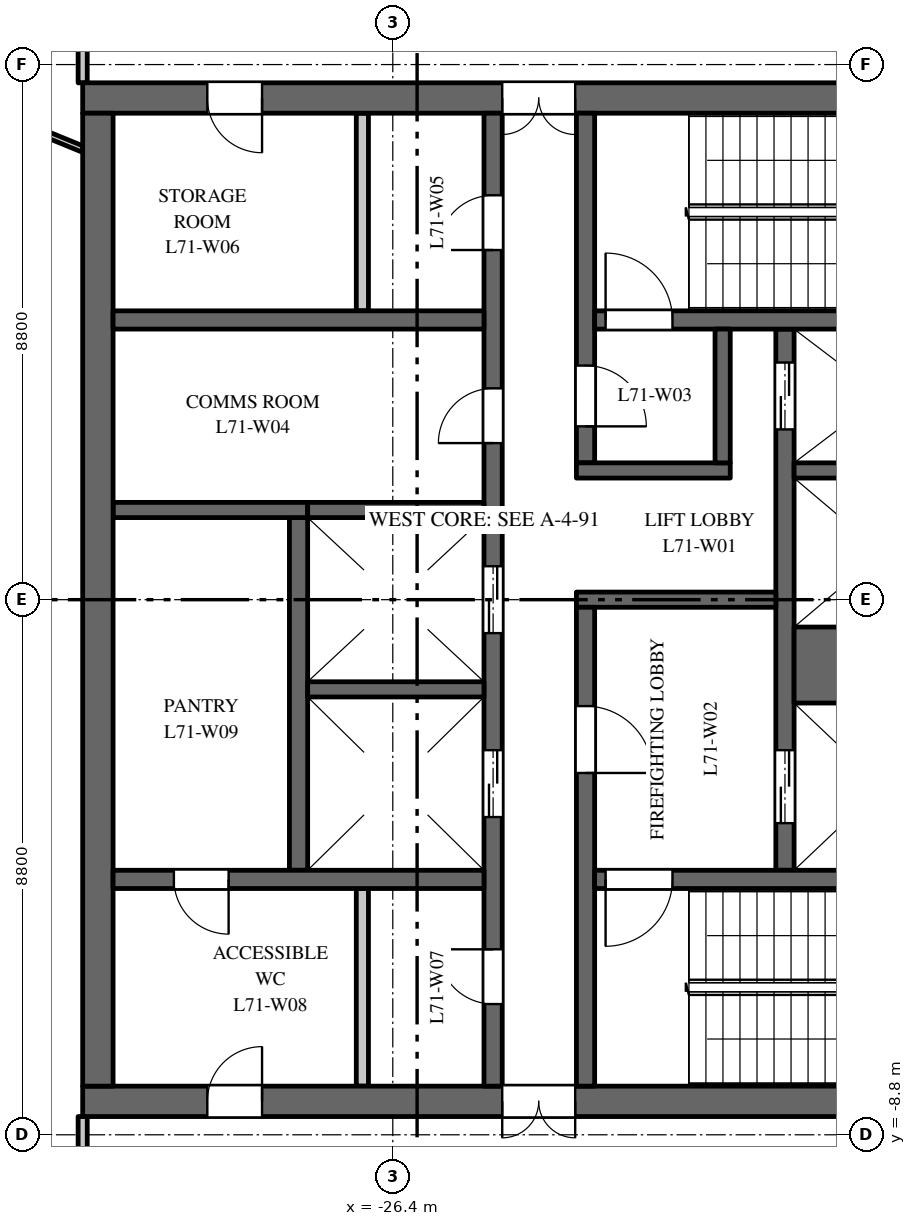
"""IFC4 building model, lengths in metres.
Left out: names, types, materials, properties, quantities, classifications, styles, units other than length and angle.
Written with IfcOpenShell. Run it as: python <this file> out.ifc"""

import sys

from ifc_helpers import new_model, si_unit, direction, frame, frame_2d, origin, place, context, subcontext, project, spatial, rectangle, extrude, element, fill, save


model = new_model("IFC4")
c1 = context("Model", 3, precision=1e-05, world=origin(), true_north=direction((0.0, 1.0)))
c2 = subcontext(c1, "Body", "Model", "MODEL_VIEW")
j1 = project(units=[si_unit("LENGTHUNIT", "METRE"), si_unit("PLANEANGLEUNIT", "RADIAN")], contexts=[c1])
p1 = place(None, origin())
s1 = spatial("IfcSite", under=j1, at=p1, CompositionType="ELEMENT")
p2 = place(p1, origin())
s2 = spatial("IfcBuilding", under=s1, at=p2, CompositionType="ELEMENT")
p3 = place(p2, frame((0.0, 0.0, 327.0)))
s3 = spatial("IfcBuildingStorey", under=s2, at=p3, CompositionType="ELEMENT", Elevation=327.0)
p4 = place(p3, frame((-16.5, 8.25, 0.0), z_axis=(0.0, 0.0, 1.0), x_axis=(-1.0, 0.0, 0.0)))
e1 = element("IfcWall", 1, at=p4, inside=s3, PredefinedType="SHEAR", context=c2, shape_type="SweptSolid", body=[
    extrude(rectangle(XDim=15.0, YDim=0.5, at=frame_2d((7.5, 0.0))), origin(), (0.0, 0.0, 1.0), 3.7),
])
p5 = place(p4, frame((6.9, 0.0, 0.0)))
e2 = element("IfcOpeningElement", 2, at=p5, cuts=e1, PredefinedType="OPENING", context=c2, shape_type="SweptSolid", body=[
    extrude(rectangle(XDim=1.2, YDim=2.1, at=frame_2d((0.6, 1.05))), frame((0.0, 0.26, 0.0), z_axis=(0.0, -1.0, 0.0), x_axis=(1.0, 0.0, 0.0)), (0.0, 0.0, 1.0), 0.52),
])
p6 = place(p4, frame((12.05, 0.0, 0.0)))
e3 = element("IfcOpeningElement", 3, at=p6, cuts=e1, PredefinedType="OPENING", context=c2, shape_type="SweptSolid", body=[
    extrude(rectangle(XDim=0.9, YDim=2.1, at=frame_2d((0.45, 1.05))), frame((0.0, 0.26, 0.0), z_axis=(0.0, -1.0, 0.0), x_axis=(1.0, 0.0, 0.0)), (0.0, 0.0, 1.0), 0.52),
])
p7 = place(p3, frame((-16.5, -8.25, 0.0), z_axis=(0.0, 0.0, 1.0), x_axis=(-1.0, 0.0, 0.0)))
e4 = element("IfcWall", 4, at=p7, inside=s3, PredefinedType="SHEAR", context=c2, shape_type="SweptSolid", body=[
    extrude(rectangle(XDim=15.0, YDim=0.5, at=frame_2d((7.5, 0.0))), origin(), (0.0, 0.0, 1.0), 3.7),
])
p8 = place(p7, frame((6.9, 0.0, 0.0)))
e5 = element("IfcOpeningElement", 5, at=p8, cuts=e4, PredefinedType="OPENING", context=c2, shape_type="SweptSolid", body=[
    extrude(rectangle(XDim=1.2, YDim=2.1, at=frame_2d((0.6, 1.05))), frame((0.0, 0.26, 0.0), z_axis=(0.0, -1.0, 0.0), x_axis=(1.0, 0.0, 0.0)), (0.0, 0.0, 1.0), 0.52),
])
p9 = place(p7, frame((12.05, 0.0, 0.0)))
e6 = element("IfcOpeningElement", 6, at=p9, cuts=e4, PredefinedType="OPENING", context=c2, shape_type="SweptSolid", body=[
    extrude(rectangle(XDim=0.9, YDim=2.1, at=frame_2d((0.45, 1.05))), frame((0.0, 0.26, 0.0), z_axis=(0.0, -1.0, 0.0), x_axis=(1.0, 0.0, 0.0)), (0.0, 0.0, 1.0), 0.52),
])
p10 = place(p3, frame((-27.95, -4.45, 0.0), z_axis=(0.0, 0.0, 1.0), x_axis=(0.0, 1.0, 0.0)))
e7 = element("IfcWall", 7, at=p10, inside=s3, PredefinedType="SHEAR", context=c2, shape_type="SweptSolid", body=[
    extrude(rectangle(XDim=5.8, YDim=0.3, at=frame_2d((2.9, 0.0))), origin(), (0.0, 0.0, 1.0), 3.7),
])
p11 = place(p3, frame((-27.8, 1.475, 0.0), z_axis=(0.0, 0.0, 1.0), x_axis=(-1.0, 0.0, 0.0)))
e8 = element("IfcWall", 8, at=p11, inside=s3, PredefinedType="SHEAR", context=c2, shape_type="SweptSolid", body=[
    extrude(rectangle(XDim=3.2, YDim=0.25, at=frame_2d((1.6, 0.0))), origin(), (0.0, 0.0, 1.0), 3.7),
])
p12 = place(p3, frame((-19.95, -4.45, 0.0), z_axis=(0.0, 0.0, 1.0), x_axis=(0.0, 1.0, 0.0)))
e9 = element("IfcWall", 9, at=p12, inside=s3, PredefinedType="SHEAR", context=c2, shape_type="SweptSolid", body=[
    extrude(rectangle(XDim=8.9, YDim=0.3, at=frame_2d((4.45, 0.0))), origin(), (0.0, 0.0, 1.0), 3.7),
])
p13 = place(p12, frame((0.775, 0.0, 0.0)))
e10 = element("IfcOpeningElement", 10, at=p13, cuts=e9, PredefinedType="OPENING", context=c2, shape_type="SweptSolid", body=[
    extrude(rectangle(XDim=1.2, YDim=2.1, at=frame_2d((0.6, 1.05))), frame((0.0, 0.16, 0.0), z_axis=(0.0, -1.0, 0.0), x_axis=(1.0, 0.0, 0.0)), (0.0, 0.0, 1.0), 0.32),
])
p14 = place(p12, frame((7.25, 0.0, 0.0)))
e11 = element("IfcOpeningElement", 11, at=p14, cuts=e9, PredefinedType="OPENING", context=c2, shape_type="SweptSolid", body=[
    extrude(rectangle(XDim=1.1, YDim=2.1, at=frame_2d((0.55, 1.05))), frame((0.0, 0.16, 0.0), z_axis=(0.0, -1.0, 0.0), x_axis=(1.0, 0.0, 0.0)), (0.0, 0.0, 1.0), 0.32),
])
p15 = place(p3, frame((-24.75, -8.0, 0.0), z_axis=(0.0, 0.0, 1.0), x_axis=(0.0, 1.0, 0.0)))
e12 = element("IfcWall", 12, at=p15, inside=s3, PredefinedType="SHEAR", context=c2, shape_type="SweptSolid", body=[
    extrude(rectangle(XDim=16.0, YDim=0.3, at=frame_2d((8.0, 0.0))), origin(), (0.0, 0.0, 1.0), 3.7),
])
p16 = place(p15, frame((4.425, 0.0, 0.0)))
e13 = element("IfcOpeningElement", 13, at=p16, cuts=e12, PredefinedType="OPENING", context=c2, shape_type="SweptSolid", body=[
    extrude(rectangle(XDim=1.1, YDim=2.1, at=frame_2d((0.55, 1.05))), frame((0.0, 0.16, 0.0), z_axis=(0.0, -1.0, 0.0), x_axis=(1.0, 0.0, 0.0)), (0.0, 0.0, 1.0), 0.32),
])
p17 = place(p15, frame((7.45, 0.0, 0.0)))
e14 = element("IfcOpeningElement", 14, at=p17, cuts=e12, PredefinedType="OPENING", context=c2, shape_type="SweptSolid", body=[
    extrude(rectangle(XDim=1.1, YDim=2.1, at=frame_2d((0.55, 1.05))), frame((0.0, 0.16, 0.0), z_axis=(0.0, -1.0, 0.0), x_axis=(1.0, 0.0, 0.0)), (0.0, 0.0, 1.0), 0.32),
])
p18 = place(p15, frame((10.575, 0.0, 0.0)))
e15 = element("IfcOpeningElement", 15, at=p18, cuts=e12, PredefinedType="OPENING", context=c2, shape_type="SweptSolid", body=[
    extrude(rectangle(XDim=0.9, YDim=2.1, at=frame_2d((0.45, 1.05))), frame((0.0, 0.16, 0.0), z_axis=(0.0, -1.0, 0.0), x_axis=(1.0, 0.0, 0.0)), (0.0, 0.0, 1.0), 0.32),
])
p19 = place(p15, frame((13.75, 0.0, 0.0)))
e16 = element("IfcOpeningElement", 16, at=p19, cuts=e12, PredefinedType="OPENING", context=c2, shape_type="SweptSolid", body=[
    extrude(rectangle(XDim=0.9, YDim=2.1, at=frame_2d((0.45, 1.05))), frame((0.0, 0.16, 0.0), z_axis=(0.0, -1.0, 0.0), x_axis=(1.0, 0.0, 0.0)), (0.0, 0.0, 1.0), 0.32),
])
p20 = place(p15, frame((1.35, 0.0, 0.0)))
e17 = element("IfcOpeningElement", 17, at=p20, cuts=e12, PredefinedType="OPENING", context=c2, shape_type="SweptSolid", body=[
    extrude(rectangle(XDim=0.9, YDim=2.1, at=frame_2d((0.45, 1.05))), frame((0.0, 0.16, 0.0), z_axis=(0.0, -1.0, 0.0), x_axis=(1.0, 0.0, 0.0)), (0.0, 0.0, 1.0), 0.32),
])
p21 = place(p3, frame((-20.1, 0.0, 0.0), z_axis=(0.0, 0.0, 1.0), x_axis=(-1.0, 0.0, 0.0)))
e18 = element("IfcWall", 18, at=p21, inside=s3, PredefinedType="SHEAR", context=c2, shape_type="SweptSolid", body=[
    extrude(rectangle(XDim=3.28, YDim=0.25, at=frame_2d((1.64, 0.0))), origin(), (0.0, 0.0, 1.0), 3.7),
])
p22 = place(p3, frame((-31.25, -8.0, 0.0), z_axis=(0.0, 0.0, 1.0), x_axis=(0.0, 1.0, 0.0)))
e19 = element("IfcWall", 19, at=p22, inside=s3, PredefinedType="SHEAR", context=c2, shape_type="SweptSolid", body=[
    extrude(rectangle(XDim=16.0, YDim=0.5, at=frame_2d((8.0, 0.0))), origin(), (0.0, 0.0, 1.0), 3.7),
])
p23 = place(p3, frame((-24.9, 4.6, 0.0), z_axis=(0.0, 0.0, 1.0), x_axis=(-1.0, 0.0, 0.0)))
e20 = element("IfcWall", 20, at=p23, inside=s3, PredefinedType="SHEAR", context=c2, shape_type="SweptSolid", body=[
    extrude(rectangle(XDim=6.1, YDim=0.3, at=frame_2d((3.05, 0.0))), origin(), (0.0, 0.0, 1.0), 3.7),
])
for number, where, z_axis, x_axis in (
    (21, (-26.9, 4.75, 0.0), (0.0, 0.0, 1.0), (0.0, 1.0, 0.0)),
    (22, (-26.9, -8.0, 0.0), (0.0, 0.0, 1.0), (0.0, 1.0, 0.0)),
):
    element("IfcWall", number, at=place(p3, frame(where, z_axis=z_axis, x_axis=x_axis)), inside=s3, PredefinedType="PARTITIONING", context=c2, shape_type="SweptSolid", body=[
        extrude(rectangle(XDim=3.25, YDim=0.2, at=frame_2d((1.625, 0.0))), origin(), (0.0, 0.0, 1.0), 3.7),
    ])
p24 = place(p3, frame((-24.9, -4.6, 0.0), z_axis=(0.0, 0.0, 1.0), x_axis=(-1.0, 0.0, 0.0)))
e23 = element("IfcWall", 23, at=p24, inside=s3, PredefinedType="SHEAR", context=c2, shape_type="SweptSolid", body=[
    extrude(rectangle(XDim=6.1, YDim=0.3, at=frame_2d((3.05, 0.0))), origin(), (0.0, 0.0, 1.0), 3.7),
])
p25 = place(p24, frame((4.2, 0.0, 0.0)))
e24 = element("IfcOpeningElement", 24, at=p25, cuts=e23, PredefinedType="OPENING", context=c2, shape_type="SweptSolid", body=[
    extrude(rectangle(XDim=0.9, YDim=2.1, at=frame_2d((0.45, 1.05))), frame((0.0, 0.16, 0.0), z_axis=(0.0, -1.0, 0.0), x_axis=(1.0, 0.0, 0.0)), (0.0, 0.0, 1.0), 0.32),
])
p26 = place(p3, frame((-16.9, -1.075, 0.0), z_axis=(0.0, 0.0, 1.0), x_axis=(-1.0, 0.0, 0.0)))
e25 = element("IfcWall", 25, at=p26, inside=s3, PredefinedType="SHEAR", context=c2, shape_type="SweptSolid", body=[
    extrude(rectangle(XDim=2.9, YDim=1.25, at=frame_2d((1.45, 0.0))), origin(), (0.0, 0.0, 1.0), 3.7),
])
for number, where, z_axis, x_axis in (
    (26, (-16.9, 2.125, 0.0), (0.0, 0.0, 1.0), (-1.0, 0.0, 0.0)),
    (27, (-24.9, -1.475, 0.0), (0.0, 0.0, 1.0), (-1.0, 0.0, 0.0)),
    (28, (-24.9, 1.475, 0.0), (0.0, 0.0, 1.0), (-1.0, 0.0, 0.0)),
):
    element("IfcWall", number, at=place(p3, frame(where, z_axis=z_axis, x_axis=x_axis)), inside=s3, PredefinedType="SHEAR", context=c2, shape_type="SweptSolid", body=[
        extrude(rectangle(XDim=2.9, YDim=0.25, at=frame_2d((1.45, 0.0))), origin(), (0.0, 0.0, 1.0), 3.7),
    ])
p27 = place(p3, frame((-23.23, 2.25, 0.0), z_axis=(0.0, 0.0, 1.0), x_axis=(0.0, 1.0, 0.0)))
e29 = element("IfcWall", 29, at=p27, inside=s3, PredefinedType="SHEAR", context=c2, shape_type="SweptSolid", body=[
    extrude(rectangle(XDim=5.75, YDim=0.3, at=frame_2d((2.875, 0.0))), origin(), (0.0, 0.0, 1.0), 3.7),
])
p28 = place(p27, frame((0.6, 0.0, 0.0)))
e30 = element("IfcOpeningElement", 30, at=p28, cuts=e29, PredefinedType="OPENING", context=c2, shape_type="SweptSolid", body=[
    extrude(rectangle(XDim=1.0, YDim=2.1, at=frame_2d((0.5, 1.05))), frame((0.0, 0.16, 0.0), z_axis=(0.0, -1.0, 0.0), x_axis=(1.0, 0.0, 0.0)), (0.0, 0.0, 1.0), 0.32),
])
p29 = place(p3, frame((-23.23, -8.0, 0.0), z_axis=(0.0, 0.0, 1.0), x_axis=(0.0, 1.0, 0.0)))
e31 = element("IfcWall", 31, at=p29, inside=s3, PredefinedType="SHEAR", context=c2, shape_type="SweptSolid", body=[
    extrude(rectangle(XDim=7.875, YDim=0.3, at=frame_2d((3.938, 0.0))), origin(), (0.0, 0.0, 1.0), 3.7),
])
p30 = place(p29, frame((5.15, 0.0, 0.0)))
e32 = element("IfcOpeningElement", 32, at=p30, cuts=e31, PredefinedType="OPENING", context=c2, shape_type="SweptSolid", body=[
    extrude(rectangle(XDim=1.1, YDim=2.1, at=frame_2d((0.55, 1.05))), frame((0.0, 0.16, 0.0), z_axis=(0.0, -1.0, 0.0), x_axis=(1.0, 0.0, 0.0)), (0.0, 0.0, 1.0), 0.32),
])
p31 = place(p3, frame((-16.9, 4.6, 0.0), z_axis=(0.0, 0.0, 1.0), x_axis=(-1.0, 0.0, 0.0)))
e33 = element("IfcWall", 33, at=p31, inside=s3, PredefinedType="SHEAR", context=c2, shape_type="SweptSolid", body=[
    extrude(rectangle(XDim=6.18, YDim=0.3, at=frame_2d((3.09, 0.0))), origin(), (0.0, 0.0, 1.0), 3.7),
])
p32 = place(p31, frame((4.9, 0.0, 0.0)))
e34 = element("IfcOpeningElement", 34, at=p32, cuts=e33, PredefinedType="OPENING", context=c2, shape_type="SweptSolid", body=[
    extrude(rectangle(XDim=1.1, YDim=2.1, at=frame_2d((0.55, 1.05))), frame((0.0, 0.16, 0.0), z_axis=(0.0, -1.0, 0.0), x_axis=(1.0, 0.0, 0.0)), (0.0, 0.0, 1.0), 0.32),
])
p33 = place(p3, frame((-16.9, -4.6, 0.0), z_axis=(0.0, 0.0, 1.0), x_axis=(-1.0, 0.0, 0.0)))
e35 = element("IfcWall", 35, at=p33, inside=s3, PredefinedType="SHEAR", context=c2, shape_type="SweptSolid", body=[
    extrude(rectangle(XDim=6.18, YDim=0.3, at=frame_2d((3.09, 0.0))), origin(), (0.0, 0.0, 1.0), 3.7),
])
p34 = place(p33, frame((4.9, 0.0, 0.0)))
e36 = element("IfcOpeningElement", 36, at=p34, cuts=e35, PredefinedType="OPENING", context=c2, shape_type="SweptSolid", body=[
    extrude(rectangle(XDim=1.1, YDim=2.1, at=frame_2d((0.55, 1.05))), frame((0.0, 0.16, 0.0), z_axis=(0.0, -1.0, 0.0), x_axis=(1.0, 0.0, 0.0)), (0.0, 0.0, 1.0), 0.32),
])
p35 = place(p3, frame((-20.85, 2.125, 0.0), z_axis=(0.0, 0.0, 1.0), x_axis=(-1.0, 0.0, 0.0)))
e37 = element("IfcWall", 37, at=p35, inside=s3, PredefinedType="SHEAR", context=c2, shape_type="SweptSolid", body=[
    extrude(rectangle(XDim=2.53, YDim=0.25, at=frame_2d((1.265, 0.0))), origin(), (0.0, 0.0, 1.0), 3.7),
])
p36 = place(p3, frame((-20.975, 2.25, 0.0), z_axis=(0.0, 0.0, 1.0), x_axis=(0.0, 1.0, 0.0)))
e38 = element("IfcWall", 38, at=p36, inside=s3, PredefinedType="SHEAR", context=c2, shape_type="SweptSolid", body=[
    extrude(rectangle(XDim=2.2, YDim=0.25, at=frame_2d((1.1, 0.0))), origin(), (0.0, 0.0, 1.0), 3.7),
])
p37 = place(p3, frame((-34.234, 8.53, 0.0), z_axis=(0.0, 0.0, 1.0), x_axis=(0.925344112436, -0.379128307542, 0.0)))
e39 = element("IfcWall", 39, at=p37, inside=s3, PredefinedType="PARTITIONING", context=c2, shape_type="SweptSolid", body=[
    extrude(rectangle(XDim=2.954, YDim=0.1, at=frame_2d((1.477, 0.0))), origin(), (0.0, 0.0, 1.0), 3.0),
])
for number, where, z_axis, x_axis in (
    (40, (-31.5, -10.7, 0.0), (0.0, 0.0, 1.0), (0.0, 1.0, 0.0)),
    (41, (-31.5, 8.5, 0.0), (0.0, 0.0, 1.0), (0.0, 1.0, 0.0)),
):
    element("IfcWall", number, at=place(p3, frame(where, z_axis=z_axis, x_axis=x_axis)), inside=s3, PredefinedType="PARTITIONING", context=c2, shape_type="SweptSolid", body=[
        extrude(rectangle(XDim=2.2, YDim=0.15, at=frame_2d((1.1, 0.0))), origin(), (0.0, 0.0, 1.0), 3.0),
    ])
p38 = place(p13, origin())
e42 = element("IfcDoor", 42, at=p38, inside=s3, OperationType="DOUBLE_DOOR_SLIDING", PredefinedType="DOOR", context=c2, shape_type="SweptSolid", body=[
    extrude(rectangle(XDim=1.2, YDim=2.1, at=frame_2d((0.6, 1.05))), frame((0.0, 0.025, 0.0), z_axis=(0.0, -1.0, 0.0), x_axis=(1.0, 0.0, 0.0)), (0.0, 0.0, 1.0), 0.05),
])
fill(e10, e42)
p39 = place(p14, origin())
e43 = element("IfcDoor", 43, at=p39, inside=s3, OperationType="DOUBLE_DOOR_SLIDING", PredefinedType="DOOR", context=c2, shape_type="SweptSolid", body=[
    extrude(rectangle(XDim=1.1, YDim=2.1, at=frame_2d((0.55, 1.05))), frame((0.0, 0.025, 0.0), z_axis=(0.0, -1.0, 0.0), x_axis=(1.0, 0.0, 0.0)), (0.0, 0.0, 1.0), 0.05),
])
fill(e11, e43)
p40 = place(p16, origin())
e44 = element("IfcDoor", 44, at=p40, inside=s3, OperationType="DOUBLE_DOOR_SLIDING", PredefinedType="DOOR", context=c2, shape_type="SweptSolid", body=[
    extrude(rectangle(XDim=1.1, YDim=2.1, at=frame_2d((0.55, 1.05))), frame((0.0, 0.025, 0.0), z_axis=(0.0, -1.0, 0.0), x_axis=(1.0, 0.0, 0.0)), (0.0, 0.0, 1.0), 0.05),
])
fill(e13, e44)
p41 = place(p17, origin())
e45 = element("IfcDoor", 45, at=p41, inside=s3, OperationType="DOUBLE_DOOR_SLIDING", PredefinedType="DOOR", context=c2, shape_type="SweptSolid", body=[
    extrude(rectangle(XDim=1.1, YDim=2.1, at=frame_2d((0.55, 1.05))), frame((0.0, 0.025, 0.0), z_axis=(0.0, -1.0, 0.0), x_axis=(1.0, 0.0, 0.0)), (0.0, 0.0, 1.0), 0.05),
])
fill(e14, e45)
p42 = place(p32, origin())
e46 = element("IfcDoor", 46, at=p42, inside=s3, OperationType="SINGLE_SWING_RIGHT", PredefinedType="DOOR", context=c2, shape_type="SweptSolid", body=[
    extrude(rectangle(XDim=1.1, YDim=2.1, at=frame_2d((0.55, 1.05))), frame((0.0, 0.025, 0.0), z_axis=(0.0, -1.0, 0.0), x_axis=(1.0, 0.0, 0.0)), (0.0, 0.0, 1.0), 0.05),
])
fill(e34, e46)
p43 = place(p34, origin())
e47 = element("IfcDoor", 47, at=p43, inside=s3, OperationType="SINGLE_SWING_LEFT", PredefinedType="DOOR", context=c2, shape_type="SweptSolid", body=[
    extrude(rectangle(XDim=1.1, YDim=2.1, at=frame_2d((0.55, 1.05))), frame((0.0, 0.025, 0.0), z_axis=(0.0, -1.0, 0.0), x_axis=(1.0, 0.0, 0.0)), (0.0, 0.0, 1.0), 0.05),
])
fill(e36, e47)
p44 = place(p30, origin())
e48 = element("IfcDoor", 48, at=p44, inside=s3, OperationType="SINGLE_SWING_LEFT", PredefinedType="DOOR", context=c2, shape_type="SweptSolid", body=[
    extrude(rectangle(XDim=1.1, YDim=2.1, at=frame_2d((0.55, 1.05))), frame((0.0, 0.025, 0.0), z_axis=(0.0, -1.0, 0.0), x_axis=(1.0, 0.0, 0.0)), (0.0, 0.0, 1.0), 0.05),
])
fill(e32, e48)
p45 = place(p28, origin())
e49 = element("IfcDoor", 49, at=p45, inside=s3, OperationType="SINGLE_SWING_LEFT", PredefinedType="DOOR", context=c2, shape_type="SweptSolid", body=[
    extrude(rectangle(XDim=1.0, YDim=2.1, at=frame_2d((0.5, 1.05))), frame((0.0, 0.025, 0.0), z_axis=(0.0, -1.0, 0.0), x_axis=(1.0, 0.0, 0.0)), (0.0, 0.0, 1.0), 0.05),
])
fill(e30, e49)
p46 = place(p5, origin())
e50 = element("IfcDoor", 50, at=p46, inside=s3, OperationType="DOUBLE_DOOR_DOUBLE_SWING", PredefinedType="DOOR", context=c2, shape_type="SweptSolid", body=[
    extrude(rectangle(XDim=1.2, YDim=2.1, at=frame_2d((0.6, 1.05))), frame((0.0, 0.025, 0.0), z_axis=(0.0, -1.0, 0.0), x_axis=(1.0, 0.0, 0.0)), (0.0, 0.0, 1.0), 0.05),
])
fill(e2, e50)
p47 = place(p8, origin())
e51 = element("IfcDoor", 51, at=p47, inside=s3, OperationType="DOUBLE_DOOR_DOUBLE_SWING", PredefinedType="DOOR", context=c2, shape_type="SweptSolid", body=[
    extrude(rectangle(XDim=1.2, YDim=2.1, at=frame_2d((0.6, 1.05))), frame((0.0, 0.025, 0.0), z_axis=(0.0, -1.0, 0.0), x_axis=(1.0, 0.0, 0.0)), (0.0, 0.0, 1.0), 0.05),
])
fill(e5, e51)
p48 = place(p18, origin())
e52 = element("IfcDoor", 52, at=p48, inside=s3, OperationType="SINGLE_SWING_RIGHT", PredefinedType="DOOR", context=c2, shape_type="SweptSolid", body=[
    extrude(rectangle(XDim=0.9, YDim=2.1, at=frame_2d((0.45, 1.05))), frame((0.0, 0.025, 0.0), z_axis=(0.0, -1.0, 0.0), x_axis=(1.0, 0.0, 0.0)), (0.0, 0.0, 1.0), 0.05),
])
fill(e15, e52)
p49 = place(p19, origin())
e53 = element("IfcDoor", 53, at=p49, inside=s3, OperationType="SINGLE_SWING_RIGHT", PredefinedType="DOOR", context=c2, shape_type="SweptSolid", body=[
    extrude(rectangle(XDim=0.9, YDim=2.1, at=frame_2d((0.45, 1.05))), frame((0.0, 0.025, 0.0), z_axis=(0.0, -1.0, 0.0), x_axis=(1.0, 0.0, 0.0)), (0.0, 0.0, 1.0), 0.05),
])
fill(e16, e53)
p50 = place(p6, origin())
e54 = element("IfcDoor", 54, at=p50, inside=s3, OperationType="SINGLE_SWING_RIGHT", PredefinedType="DOOR", context=c2, shape_type="SweptSolid", body=[
    extrude(rectangle(XDim=0.9, YDim=2.1, at=frame_2d((0.45, 1.05))), frame((0.0, 0.025, 0.0), z_axis=(0.0, -1.0, 0.0), x_axis=(1.0, 0.0, 0.0)), (0.0, 0.0, 1.0), 0.05),
])
fill(e3, e54)
p51 = place(p20, origin())
e55 = element("IfcDoor", 55, at=p51, inside=s3, OperationType="SINGLE_SWING_LEFT", PredefinedType="DOOR", context=c2, shape_type="SweptSolid", body=[
    extrude(rectangle(XDim=0.9, YDim=2.1, at=frame_2d((0.45, 1.05))), frame((0.0, 0.025, 0.0), z_axis=(0.0, -1.0, 0.0), x_axis=(1.0, 0.0, 0.0)), (0.0, 0.0, 1.0), 0.05),
])
fill(e17, e55)
p52 = place(p9, origin())
e56 = element("IfcDoor", 56, at=p52, inside=s3, OperationType="SINGLE_SWING_LEFT", PredefinedType="DOOR", context=c2, shape_type="SweptSolid", body=[
    extrude(rectangle(XDim=0.9, YDim=2.1, at=frame_2d((0.45, 1.05))), frame((0.0, 0.025, 0.0), z_axis=(0.0, -1.0, 0.0), x_axis=(1.0, 0.0, 0.0)), (0.0, 0.0, 1.0), 0.05),
])
fill(e6, e56)
p53 = place(p25, origin())
e57 = element("IfcDoor", 57, at=p53, inside=s3, OperationType="SINGLE_SWING_RIGHT", PredefinedType="DOOR", context=c2, shape_type="SweptSolid", body=[
    extrude(rectangle(XDim=0.9, YDim=2.1, at=frame_2d((0.45, 1.05))), frame((0.0, 0.025, 0.0), z_axis=(0.0, -1.0, 0.0), x_axis=(1.0, 0.0, 0.0)), (0.0, 0.0, 1.0), 0.05),
])
fill(e24, e57)
save(model, sys.argv[1])
